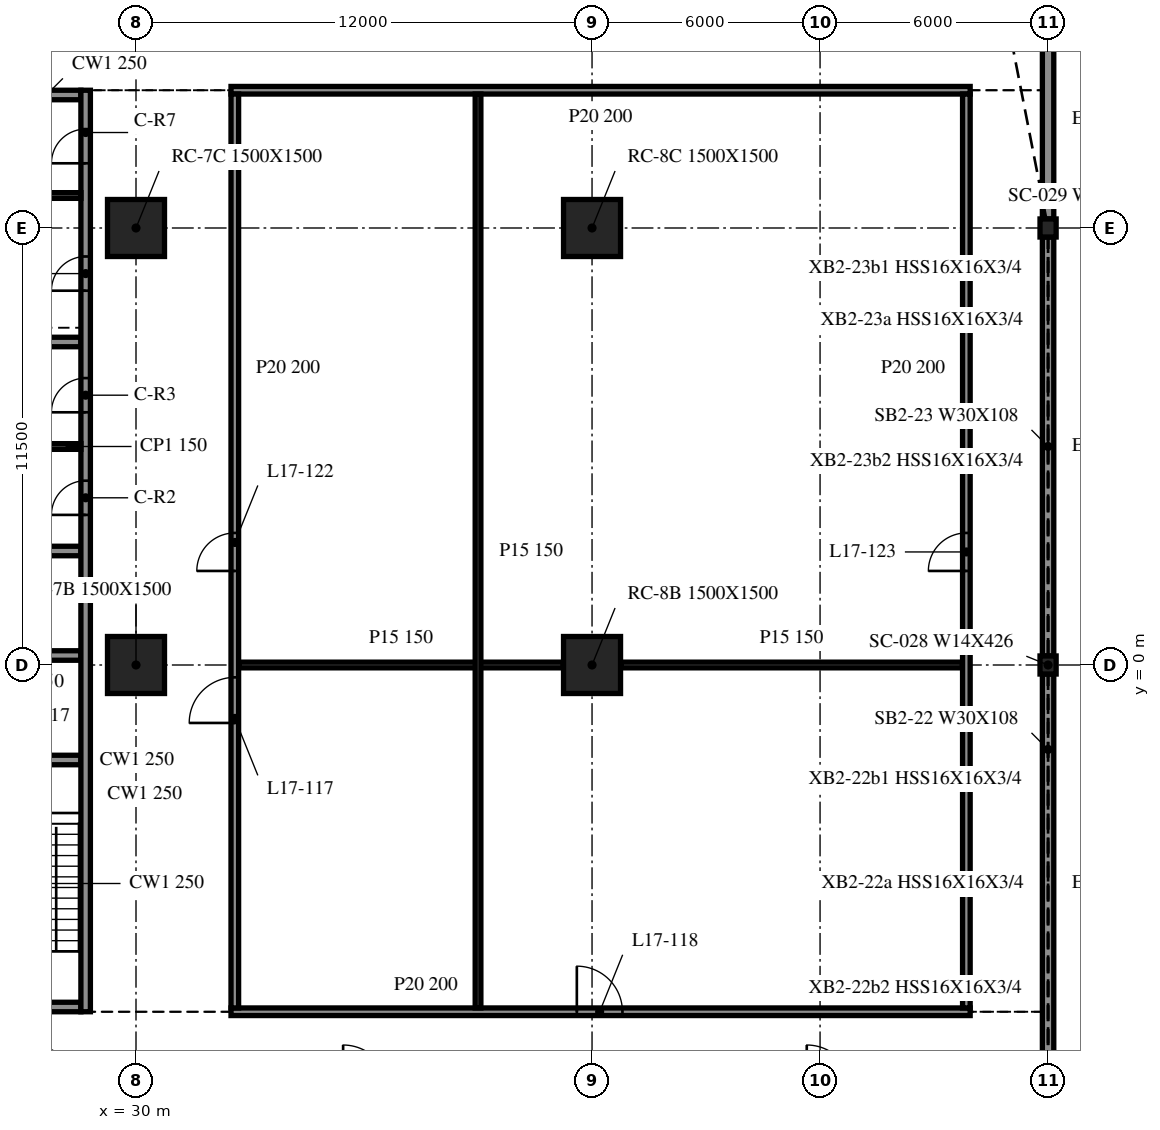
"""IFC4 building model, lengths in metres.
Left out: names, types, materials, properties, quantities, classifications, styles, units other than length and angle.
Written with IfcOpenShell. Run it as: python <this file> out.ifc"""

import sys

from ifc_helpers import new_model, si_unit, direction, frame, frame_2d, origin, origin_2d, place, context, subcontext, project, spatial, rectangle, i_section, extrude, element, fill, save


model = new_model("IFC4")
c1 = context("Model", 3, precision=1e-05, world=origin(), true_north=direction((0.0, 1.0)))
c2 = subcontext(c1, "Body", "Model", "MODEL_VIEW")
j1 = project(units=[si_unit("LENGTHUNIT", "METRE"), si_unit("PLANEANGLEUNIT", "RADIAN")], contexts=[c1])
p1 = place(None, origin())
s1 = spatial("IfcSite", under=j1, at=p1, CompositionType="ELEMENT")
p2 = place(p1, origin())
s2 = spatial("IfcBuilding", under=s1, at=p2, CompositionType="ELEMENT")
p3 = place(p2, frame((0.0, 0.0, 76.1)))
s3 = spatial("IfcBuildingStorey", under=s2, at=p3, CompositionType="ELEMENT", Elevation=76.1)
for number, where, z_axis, x_axis in (
    (1, (30.0, 0.0, -0.34), (0.0, 0.0, 1.0), (1.0, 0.0, 0.0)),
    (2, (30.0, 11.5, -0.34), (0.0, 0.0, 1.0), (1.0, 0.0, 0.0)),
    (3, (42.0, 0.0, -0.34), (0.0, 0.0, 1.0), (1.0, 0.0, 0.0)),
    (4, (42.0, 11.5, -0.34), (0.0, 0.0, 1.0), (1.0, 0.0, 0.0)),
):
    element("IfcColumn", number, at=place(p3, frame(where, z_axis=z_axis, x_axis=x_axis)), inside=s3, PredefinedType="COLUMN", context=c2, shape_type="SweptSolid", body=[
        extrude(rectangle(XDim=1.5, YDim=1.5, at=origin_2d()), origin(), (0.0, 0.0, 1.0), 4.09),
    ])
for number, where, z_axis, x_axis in (
    (5, (54.0, 0.0, -0.34), (0.0, 0.0, 1.0), (1.0, 0.0, 0.0)),
    (6, (54.0, 11.5, -0.34), (0.0, 0.0, 1.0), (1.0, 0.0, 0.0)),
):
    element("IfcColumn", number, at=place(p3, frame(where, z_axis=z_axis, x_axis=x_axis)), inside=s3, PredefinedType="COLUMN", context=c2, shape_type="SweptSolid", body=[
        extrude(i_section(OverallWidth=0.424, OverallDepth=0.475, WebThickness=0.048, FlangeThickness=0.077, at=origin_2d()), origin(), (0.0, 0.0, 1.0), 4.09),
    ])
for number, where, z_axis, x_axis in (
    (7, (54.0, -11.262, 0.0), (0.0, 0.0, 1.0), (0.0, 1.0, 0.0)),
    (8, (54.0, 0.238, 0.0), (0.0, 0.0, 1.0), (0.0, 1.0, 0.0)),
):
    element("IfcWall", number, at=place(p3, frame(where, z_axis=z_axis, x_axis=x_axis)), inside=s3, PredefinedType="NOTDEFINED", context=c2, shape_type="SweptSolid", body=[
        extrude(rectangle(XDim=11.024, YDim=0.3, at=frame_2d((5.512, 0.0))), origin(), (0.0, 0.0, 1.0), 3.75),
    ])
p4 = place(p3, frame((54.0, 11.738, 0.0), z_axis=(0.0, 0.0, 1.0), x_axis=(0.0, 1.0, 0.0)))
e9 = element("IfcWall", 9, at=p4, inside=s3, PredefinedType="NOTDEFINED", context=c2, shape_type="SweptSolid", body=[
    extrude(rectangle(XDim=5.262, YDim=0.3, at=frame_2d((2.631, 0.0))), origin(), (0.0, 0.0, 1.0), 3.75),
])
p5 = place(p3, frame((28.675, -9.125, 0.0), z_axis=(0.0, 0.0, 1.0), x_axis=(0.0, 1.0, 0.0)))
e10 = element("IfcWall", 10, at=p5, inside=s3, PredefinedType="SOLIDWALL", context=c2, shape_type="SweptSolid", body=[
    extrude(rectangle(XDim=24.25, YDim=0.25, at=frame_2d((12.125, 0.0))), origin(), (0.0, 0.0, 1.0), 3.75),
])
p6 = place(p5, frame((13.075, 0.0, 0.0)))
e11 = element("IfcOpeningElement", 11, at=p6, cuts=e10, PredefinedType="OPENING", context=c2, shape_type="SweptSolid", body=[
    extrude(rectangle(XDim=0.9, YDim=2.1, at=frame_2d((0.45, 1.05))), frame((0.0, 0.135, 0.0), z_axis=(0.0, -1.0, 0.0), x_axis=(1.0, 0.0, 0.0)), (0.0, 0.0, 1.0), 0.27),
])
p7 = place(p5, frame((15.775, 0.0, 0.0)))
e12 = element("IfcOpeningElement", 12, at=p7, cuts=e10, PredefinedType="OPENING", context=c2, shape_type="SweptSolid", body=[
    extrude(rectangle(XDim=0.9, YDim=2.1, at=frame_2d((0.45, 1.05))), frame((0.0, 0.135, 0.0), z_axis=(0.0, -1.0, 0.0), x_axis=(1.0, 0.0, 0.0)), (0.0, 0.0, 1.0), 0.27),
])
p8 = place(p5, frame((18.975, 0.0, 0.0)))
e13 = element("IfcOpeningElement", 13, at=p8, cuts=e10, PredefinedType="OPENING", context=c2, shape_type="SweptSolid", body=[
    extrude(rectangle(XDim=0.9, YDim=2.1, at=frame_2d((0.45, 1.05))), frame((0.0, 0.135, 0.0), z_axis=(0.0, -1.0, 0.0), x_axis=(1.0, 0.0, 0.0)), (0.0, 0.0, 1.0), 0.27),
])
p9 = place(p5, frame((22.327, 0.0, 0.0)))
e14 = element("IfcOpeningElement", 14, at=p9, cuts=e10, PredefinedType="OPENING", context=c2, shape_type="SweptSolid", body=[
    extrude(rectangle(XDim=0.9, YDim=2.1, at=frame_2d((0.45, 1.05))), frame((0.0, 0.135, 0.0), z_axis=(0.0, -1.0, 0.0), x_axis=(1.0, 0.0, 0.0)), (0.0, 0.0, 1.0), 0.27),
])
p10 = place(p3, frame((28.55, -9.0, 0.0), z_axis=(0.0, 0.0, 1.0), x_axis=(-1.0, 0.0, 0.0)))
e15 = element("IfcWall", 15, at=p10, inside=s3, PredefinedType="SOLIDWALL", context=c2, shape_type="SweptSolid", body=[
    extrude(rectangle(XDim=9.1, YDim=0.25, at=frame_2d((4.55, 0.0))), origin(), (0.0, 0.0, 1.0), 3.75),
])
p11 = place(p10, frame((3.65, 0.0, 0.0)))
e16 = element("IfcOpeningElement", 16, at=p11, cuts=e15, PredefinedType="OPENING", context=c2, shape_type="SweptSolid", body=[
    extrude(rectangle(XDim=1.8, YDim=2.1, at=frame_2d((0.9, 1.05))), frame((0.0, 0.135, 0.0), z_axis=(0.0, -1.0, 0.0), x_axis=(1.0, 0.0, 0.0)), (0.0, 0.0, 1.0), 0.27),
])
p12 = place(p3, frame((19.45, 15.0, 0.0), z_axis=(0.0, 0.0, 1.0), x_axis=(1.0, 0.0, 0.0)))
e17 = element("IfcWall", 17, at=p12, inside=s3, PredefinedType="SOLIDWALL", context=c2, shape_type="SweptSolid", body=[
    extrude(rectangle(XDim=9.1, YDim=0.25, at=frame_2d((4.55, 0.0))), origin(), (0.0, 0.0, 1.0), 3.75),
])
p13 = place(p12, frame((3.65, 0.0, 0.0)))
e18 = element("IfcOpeningElement", 18, at=p13, cuts=e17, PredefinedType="OPENING", context=c2, shape_type="SweptSolid", body=[
    extrude(rectangle(XDim=1.8, YDim=2.1, at=frame_2d((0.9, 1.05))), frame((0.0, 0.135, 0.0), z_axis=(0.0, -1.0, 0.0), x_axis=(1.0, 0.0, 0.0)), (0.0, 0.0, 1.0), 0.27),
])
for number, where, z_axis, x_axis in (
    (19, (25.7, -2.5, 0.0), (0.0, 0.0, 1.0), (1.0, 0.0, 0.0)),
    (20, (25.7, 0.25, 0.0), (0.0, 0.0, 1.0), (1.0, 0.0, 0.0)),
    (21, (25.7, 3.0, 0.0), (0.0, 0.0, 1.0), (1.0, 0.0, 0.0)),
    (22, (25.7, 8.5, 0.0), (0.0, 0.0, 1.0), (1.0, 0.0, 0.0)),
):
    element("IfcWall", number, at=place(p3, frame(where, z_axis=z_axis, x_axis=x_axis)), inside=s3, PredefinedType="SOLIDWALL", context=c2, shape_type="SweptSolid", body=[
        extrude(rectangle(XDim=2.85, YDim=0.25, at=frame_2d((1.425, 0.0))), origin(), (0.0, 0.0, 1.0), 3.75),
    ])
for number, where, z_axis, x_axis in (
    (23, (25.7, 5.75, 0.0), (0.0, 0.0, 1.0), (1.0, 0.0, 0.0)),
    (24, (25.7, 12.355, 0.0), (0.0, 0.0, 1.0), (1.0, 0.0, 0.0)),
):
    element("IfcWall", number, at=place(p3, frame(where, z_axis=z_axis, x_axis=x_axis)), inside=s3, PredefinedType="PARTITIONING", context=c2, shape_type="SweptSolid", body=[
        extrude(rectangle(XDim=2.85, YDim=0.15, at=frame_2d((1.425, 0.0))), origin(), (0.0, 0.0, 1.0), 3.75),
    ])
p14 = place(p3, frame((32.5, -9.125, 0.0), z_axis=(0.0, 0.0, 1.0), x_axis=(1.0, 0.0, 0.0)))
e25 = element("IfcWall", 25, at=p14, inside=s3, PredefinedType="PARTITIONING", context=c2, shape_type="SweptSolid", body=[
    extrude(rectangle(XDim=19.45, YDim=0.2, at=frame_2d((9.725, 0.0))), origin(), (0.0, 0.0, 1.0), 3.75),
])
p15 = place(p14, frame((9.1, 0.0, 0.0)))
e26 = element("IfcOpeningElement", 26, at=p15, cuts=e25, PredefinedType="OPENING", context=c2, shape_type="SweptSolid", body=[
    extrude(rectangle(XDim=1.2, YDim=2.1, at=frame_2d((0.6, 1.05))), frame((0.0, 0.11, 0.0), z_axis=(0.0, -1.0, 0.0), x_axis=(1.0, 0.0, 0.0)), (0.0, 0.0, 1.0), 0.22),
])
p16 = place(p3, frame((32.7, 0.0, 0.0), z_axis=(0.0, 0.0, 1.0), x_axis=(1.0, 0.0, 0.0)))
e27 = element("IfcWall", 27, at=p16, inside=s3, PredefinedType="PARTITIONING", context=c2, shape_type="SweptSolid", body=[
    extrude(rectangle(XDim=8.55, YDim=0.15, at=frame_2d((4.275, 0.0))), origin(), (0.0, 0.0, 1.0), 3.75),
])
p17 = place(p3, frame((42.75, 0.0, 0.0), z_axis=(0.0, 0.0, 1.0), x_axis=(1.0, 0.0, 0.0)))
e28 = element("IfcWall", 28, at=p17, inside=s3, PredefinedType="PARTITIONING", context=c2, shape_type="SweptSolid", body=[
    extrude(rectangle(XDim=9.0, YDim=0.15, at=frame_2d((4.5, 0.0))), origin(), (0.0, 0.0, 1.0), 3.75),
])
p18 = place(p3, frame((32.5, 15.125, 0.0), z_axis=(0.0, 0.0, 1.0), x_axis=(1.0, 0.0, 0.0)))
e29 = element("IfcWall", 29, at=p18, inside=s3, PredefinedType="PARTITIONING", context=c2, shape_type="SweptSolid", body=[
    extrude(rectangle(XDim=19.45, YDim=0.2, at=frame_2d((9.725, 0.0))), origin(), (0.0, 0.0, 1.0), 3.75),
])
p19 = place(p3, frame((32.6, -9.025, 0.0), z_axis=(0.0, 0.0, 1.0), x_axis=(0.0, 1.0, 0.0)))
e30 = element("IfcWall", 30, at=p19, inside=s3, PredefinedType="PARTITIONING", context=c2, shape_type="SweptSolid", body=[
    extrude(rectangle(XDim=24.05, YDim=0.2, at=frame_2d((12.025, 0.0))), origin(), (0.0, 0.0, 1.0), 3.75),
])
p20 = place(p19, frame((7.5, 0.0, 0.0)))
e31 = element("IfcOpeningElement", 31, at=p20, cuts=e30, PredefinedType="OPENING", context=c2, shape_type="SweptSolid", body=[
    extrude(rectangle(XDim=1.2, YDim=2.1, at=frame_2d((0.6, 1.05))), frame((0.0, 0.11, 0.0), z_axis=(0.0, -1.0, 0.0), x_axis=(1.0, 0.0, 0.0)), (0.0, 0.0, 1.0), 0.22),
])
p21 = place(p19, frame((11.5, 0.0, 0.0)))
e32 = element("IfcOpeningElement", 32, at=p21, cuts=e30, PredefinedType="OPENING", context=c2, shape_type="SweptSolid", body=[
    extrude(rectangle(XDim=1.0, YDim=2.1, at=frame_2d((0.5, 1.05))), frame((0.0, 0.11, 0.0), z_axis=(0.0, -1.0, 0.0), x_axis=(1.0, 0.0, 0.0)), (0.0, 0.0, 1.0), 0.22),
])
p22 = place(p3, frame((39.0, -9.025, 0.0), z_axis=(0.0, 0.0, 1.0), x_axis=(0.0, 1.0, 0.0)))
e33 = element("IfcWall", 33, at=p22, inside=s3, PredefinedType="PARTITIONING", context=c2, shape_type="SweptSolid", body=[
    extrude(rectangle(XDim=24.05, YDim=0.15, at=frame_2d((12.025, 0.0))), origin(), (0.0, 0.0, 1.0), 3.75),
])
p23 = place(p3, frame((51.85, -9.025, 0.0), z_axis=(0.0, 0.0, 1.0), x_axis=(0.0, 1.0, 0.0)))
e34 = element("IfcWall", 34, at=p23, inside=s3, PredefinedType="PARTITIONING", context=c2, shape_type="SweptSolid", body=[
    extrude(rectangle(XDim=24.05, YDim=0.2, at=frame_2d((12.025, 0.0))), origin(), (0.0, 0.0, 1.0), 3.75),
])
p24 = place(p23, frame((11.5, 0.0, 0.0)))
e35 = element("IfcOpeningElement", 35, at=p24, cuts=e34, PredefinedType="OPENING", context=c2, shape_type="SweptSolid", body=[
    extrude(rectangle(XDim=1.0, YDim=2.1, at=frame_2d((0.5, 1.05))), frame((0.0, 0.11, 0.0), z_axis=(0.0, -1.0, 0.0), x_axis=(1.0, 0.0, 0.0)), (0.0, 0.0, 1.0), 0.22),
])
p25 = place(p6, origin())
e36 = element("IfcDoor", 36, at=p25, inside=s3, OperationType="SINGLE_SWING_RIGHT", PredefinedType="DOOR", context=c2, shape_type="SweptSolid", body=[
    extrude(rectangle(XDim=0.9, YDim=2.1, at=frame_2d((0.45, 1.05))), frame((0.0, 0.025, 0.0), z_axis=(0.0, -1.0, 0.0), x_axis=(1.0, 0.0, 0.0)), (0.0, 0.0, 1.0), 0.05),
])
fill(e11, e36)
p26 = place(p7, origin())
e37 = element("IfcDoor", 37, at=p26, inside=s3, OperationType="SINGLE_SWING_LEFT", PredefinedType="DOOR", context=c2, shape_type="SweptSolid", body=[
    extrude(rectangle(XDim=0.9, YDim=2.1, at=frame_2d((0.45, 1.05))), frame((0.0, 0.025, 0.0), z_axis=(0.0, -1.0, 0.0), x_axis=(1.0, 0.0, 0.0)), (0.0, 0.0, 1.0), 0.05),
])
fill(e12, e37)
p27 = place(p8, origin())
e38 = element("IfcDoor", 38, at=p27, inside=s3, OperationType="SINGLE_SWING_RIGHT", PredefinedType="DOOR", context=c2, shape_type="SweptSolid", body=[
    extrude(rectangle(XDim=0.9, YDim=2.1, at=frame_2d((0.45, 1.05))), frame((0.0, 0.025, 0.0), z_axis=(0.0, -1.0, 0.0), x_axis=(1.0, 0.0, 0.0)), (0.0, 0.0, 1.0), 0.05),
])
fill(e13, e38)
p28 = place(p9, origin())
e39 = element("IfcDoor", 39, at=p28, inside=s3, OperationType="SINGLE_SWING_LEFT", PredefinedType="DOOR", context=c2, shape_type="SweptSolid", body=[
    extrude(rectangle(XDim=0.9, YDim=2.1, at=frame_2d((0.45, 1.05))), frame((0.0, 0.025, 0.0), z_axis=(0.0, -1.0, 0.0), x_axis=(1.0, 0.0, 0.0)), (0.0, 0.0, 1.0), 0.05),
])
fill(e14, e39)
p29 = place(p20, origin())
e40 = element("IfcDoor", 40, at=p29, inside=s3, OperationType="SINGLE_SWING_RIGHT", PredefinedType="DOOR", context=c2, shape_type="SweptSolid", body=[
    extrude(rectangle(XDim=1.2, YDim=2.1, at=frame_2d((0.6, 1.05))), frame((0.0, 0.025, 0.0), z_axis=(0.0, -1.0, 0.0), x_axis=(1.0, 0.0, 0.0)), (0.0, 0.0, 1.0), 0.05),
])
fill(e31, e40)
p30 = place(p15, origin())
e41 = element("IfcDoor", 41, at=p30, inside=s3, OperationType="SINGLE_SWING_LEFT", PredefinedType="DOOR", context=c2, shape_type="SweptSolid", body=[
    extrude(rectangle(XDim=1.2, YDim=2.1, at=frame_2d((0.6, 1.05))), frame((0.0, 0.025, 0.0), z_axis=(0.0, -1.0, 0.0), x_axis=(1.0, 0.0, 0.0)), (0.0, 0.0, 1.0), 0.05),
])
fill(e26, e41)
p31 = place(p21, origin())
e42 = element("IfcDoor", 42, at=p31, inside=s3, OperationType="SINGLE_SWING_RIGHT", PredefinedType="DOOR", context=c2, shape_type="SweptSolid", body=[
    extrude(rectangle(XDim=1.0, YDim=2.1, at=frame_2d((0.5, 1.05))), frame((0.0, 0.025, 0.0), z_axis=(0.0, -1.0, 0.0), x_axis=(1.0, 0.0, 0.0)), (0.0, 0.0, 1.0), 0.05),
])
fill(e32, e42)
p32 = place(p24, origin())
e43 = element("IfcDoor", 43, at=p32, inside=s3, OperationType="SINGLE_SWING_LEFT", PredefinedType="DOOR", context=c2, shape_type="SweptSolid", body=[
    extrude(rectangle(XDim=1.0, YDim=2.1, at=frame_2d((0.5, 1.05))), frame((0.0, 0.025, 0.0), z_axis=(0.0, -1.0, 0.0), x_axis=(1.0, 0.0, 0.0)), (0.0, 0.0, 1.0), 0.05),
])
fill(e35, e43)
save(model, sys.argv[1])
